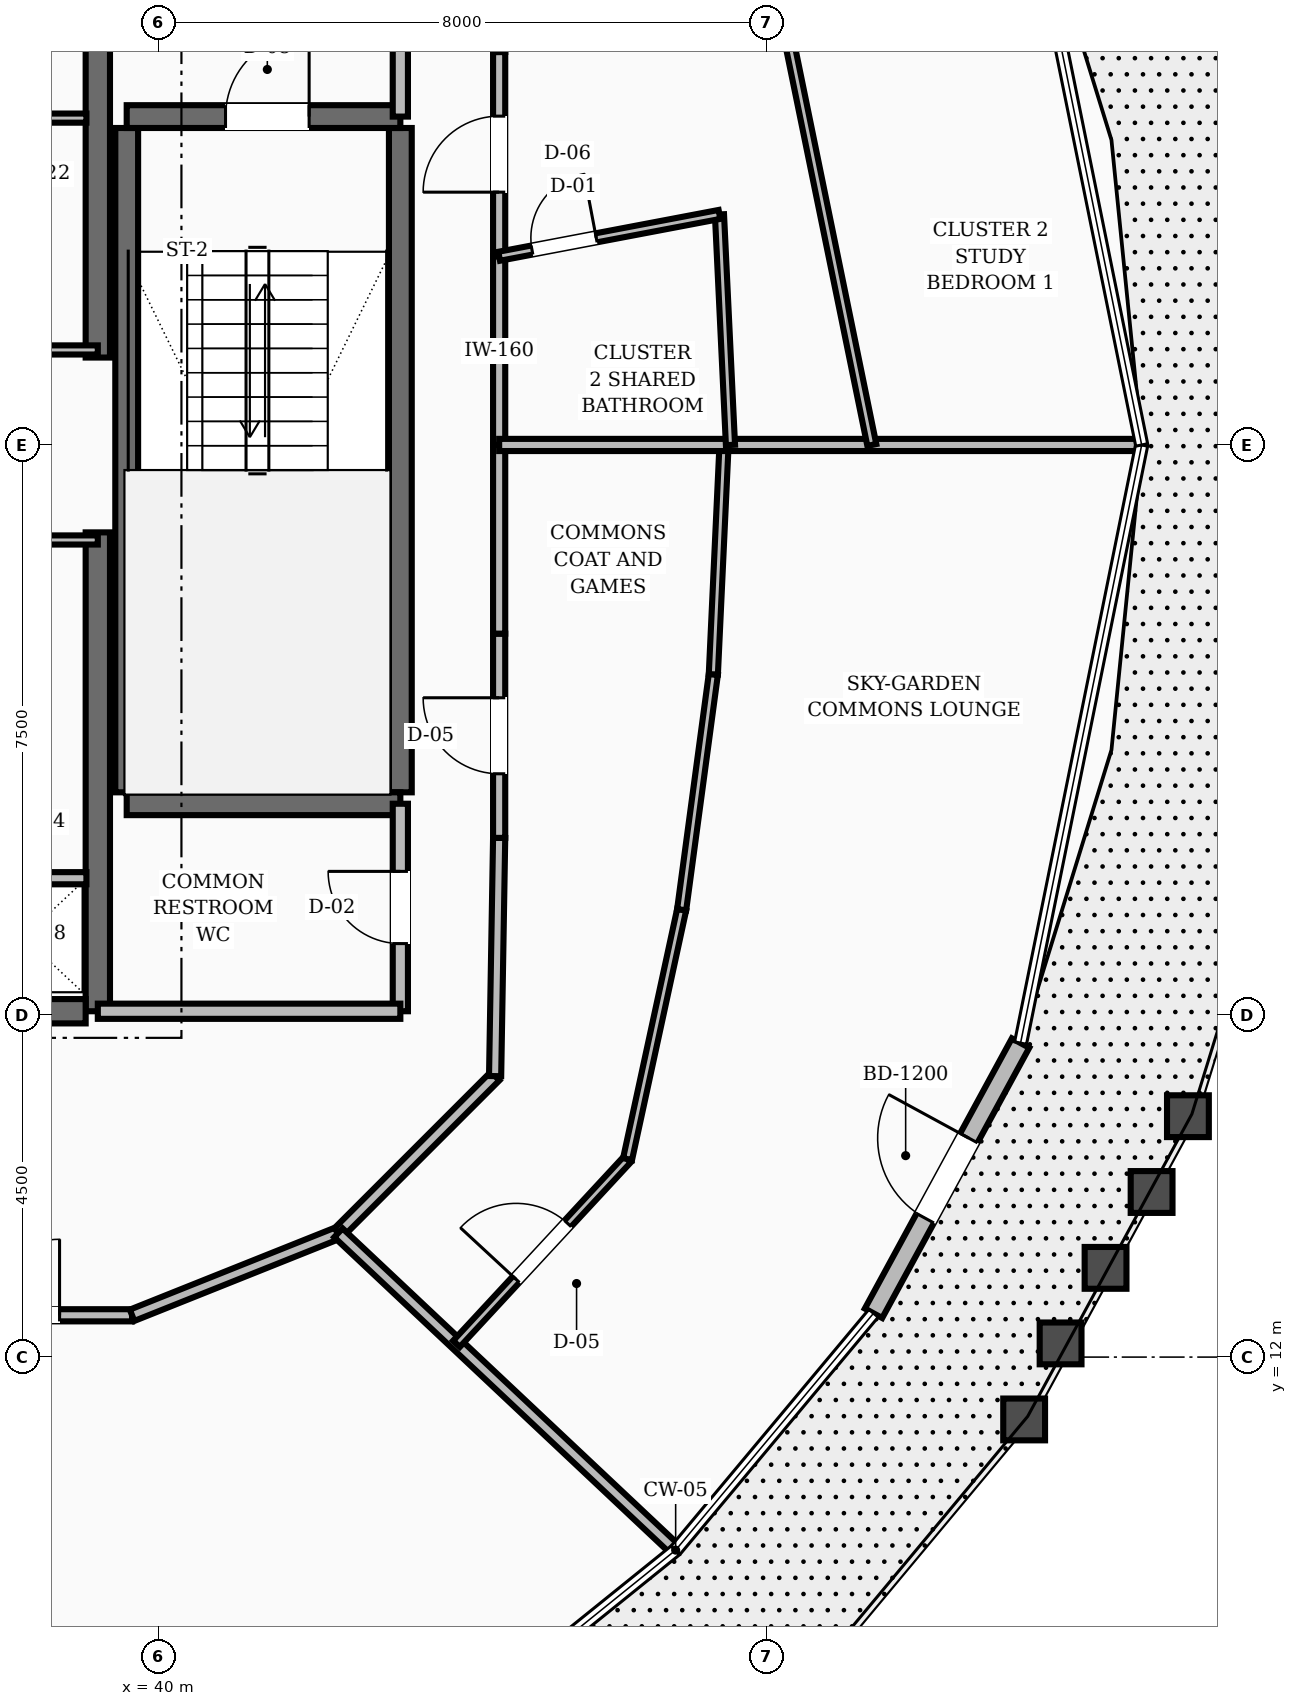
"""IFC4 building model, lengths in metres.
Left out: names, types, materials, properties, quantities, classifications, styles, units other than length and angle.
Written with IfcOpenShell. Run it as: python <this file> out.ifc"""

import sys

from ifc_helpers import new_model, si_unit, direction, frame, frame_2d, origin, place, context, subcontext, project, spatial, rectangle, extrude, element, fill, save


model = new_model("IFC4")
c1 = context("Model", 3, precision=1e-05, world=origin(), true_north=direction((0.0, 1.0)))
c2 = subcontext(c1, "Body", "Model", "MODEL_VIEW")
j1 = project(units=[si_unit("LENGTHUNIT", "METRE"), si_unit("PLANEANGLEUNIT", "RADIAN")], contexts=[c1])
p1 = place(None, origin())
s1 = spatial("IfcSite", under=j1, at=p1, CompositionType="ELEMENT")
p2 = place(p1, origin())
s2 = spatial("IfcBuilding", under=s1, at=p2, CompositionType="ELEMENT")
p3 = place(p2, frame((0.0, 0.0, 243.6)))
s3 = spatial("IfcBuildingStorey", under=s2, at=p3, CompositionType="ELEMENT", Elevation=243.6)
for number, where, z_axis, x_axis in (
    (1, (39.2, 16.55, 0.0), (0.0, 0.0, 1.0), (0.0, 1.0, 0.0)),
    (2, (39.2, 25.15, 0.0), (0.0, 0.0, 1.0), (0.0, 1.0, 0.0)),
):
    element("IfcWall", number, at=place(p3, frame(where, z_axis=z_axis, x_axis=x_axis)), inside=s3, PredefinedType="SHEAR", context=c2, shape_type="SweptSolid", body=[
        extrude(rectangle(XDim=6.3, YDim=0.32, at=frame_2d((3.15, 0.0))), origin(), (0.0, 0.0, 1.0), 3.6),
    ])
p4 = place(p3, frame((35.8, 16.55, 0.0), z_axis=(0.0, 0.0, 1.0), x_axis=(1.0, 0.0, 0.0)))
e3 = element("IfcWall", 3, at=p4, inside=s3, PredefinedType="SHEAR", context=c2, shape_type="SweptSolid", body=[
    extrude(rectangle(XDim=3.24, YDim=0.32, at=frame_2d((1.62, 0.0))), origin(), (0.0, 0.0, 1.0), 3.6),
])
p5 = place(p4, frame((0.3, 0.0, 0.0)))
e4 = element("IfcOpeningElement", 4, at=p5, cuts=e3, PredefinedType="OPENING", context=c2, shape_type="SweptSolid", body=[
    extrude(rectangle(XDim=1.1, YDim=2.1, at=frame_2d((0.55, 1.05))), frame((0.0, 0.17, 0.0), z_axis=(0.0, -1.0, 0.0), x_axis=(1.0, 0.0, 0.0)), (0.0, 0.0, 1.0), 0.34),
])
for number, where, z_axis, x_axis in (
    (5, (43.18, 19.43, 0.0), (0.0, 0.0, 1.0), (0.0, 1.0, 0.0)),
    (6, (39.58, 19.43, 0.0), (0.0, 0.0, 1.0), (0.0, 1.0, 0.0)),
):
    element("IfcWall", number, at=place(p3, frame(where, z_axis=z_axis, x_axis=x_axis)), inside=s3, PredefinedType="SHEAR", context=c2, shape_type="SweptSolid", body=[
        extrude(rectangle(XDim=8.74, YDim=0.3, at=frame_2d((4.37, 0.0))), origin(), (0.0, 0.0, 1.0), 3.6),
    ])
p6 = place(p3, frame((39.58, 19.28, 0.0), z_axis=(0.0, 0.0, 1.0), x_axis=(1.0, 0.0, 0.0)))
e7 = element("IfcWall", 7, at=p6, inside=s3, PredefinedType="SHEAR", context=c2, shape_type="SweptSolid", body=[
    extrude(rectangle(XDim=3.6, YDim=0.3, at=frame_2d((1.8, 0.0))), origin(), (0.0, 0.0, 1.0), 3.6),
])
p7 = place(p3, frame((39.58, 28.32, 0.0), z_axis=(0.0, 0.0, 1.0), x_axis=(1.0, 0.0, 0.0)))
e8 = element("IfcWall", 8, at=p7, inside=s3, PredefinedType="SHEAR", context=c2, shape_type="SweptSolid", body=[
    extrude(rectangle(XDim=3.6, YDim=0.3, at=frame_2d((1.8, 0.0))), origin(), (0.0, 0.0, 1.0), 3.6),
])
p8 = place(p7, frame((1.3, 0.0, 0.0)))
e9 = element("IfcOpeningElement", 9, at=p8, cuts=e8, PredefinedType="OPENING", context=c2, shape_type="SweptSolid", body=[
    extrude(rectangle(XDim=1.1, YDim=2.1, at=frame_2d((0.55, 1.05))), frame((0.0, 0.16, 0.0), z_axis=(0.0, -1.0, 0.0), x_axis=(1.0, 0.0, 0.0)), (0.0, 0.0, 1.0), 0.32),
])
p9 = place(p3, frame((49.405, 12.576, 0.0), z_axis=(0.0, 0.0, 1.0), x_axis=(0.4779981632, 0.878360834724, 0.0)))
e10 = element("IfcWall", 10, at=p9, inside=s3, PredefinedType="STANDARD", context=c2, shape_type="SweptSolid", body=[
    extrude(rectangle(XDim=4.047, YDim=0.26, at=frame_2d((2.023, 0.0))), origin(), (0.0, 0.0, 1.0), 2.88),
])
p10 = place(p9, frame((1.424, 0.0, 0.0)))
e11 = element("IfcOpeningElement", 11, at=p10, cuts=e10, PredefinedType="OPENING", context=c2, shape_type="SweptSolid", body=[
    extrude(rectangle(XDim=1.2, YDim=2.15, at=frame_2d((0.6, 1.075))), frame((0.0, 0.14, 0.0), z_axis=(0.0, -1.0, 0.0), x_axis=(1.0, 0.0, 0.0)), (0.0, 0.0, 1.0), 0.28),
])
p11 = place(p3, frame((43.18, 28.32, 0.0), z_axis=(0.0, 0.0, 1.0), x_axis=(0.0, 1.0, 0.0)))
e12 = element("IfcWall", 12, at=p11, inside=s3, PredefinedType="SOLIDWALL", context=c2, shape_type="SweptSolid", body=[
    extrude(rectangle(XDim=3.13, YDim=0.2, at=frame_2d((1.565, 0.0))), origin(), (0.0, 0.0, 1.0), 2.87),
])
p12 = place(p11, frame((1.015, 0.0, 0.0)))
e13 = element("IfcOpeningElement", 13, at=p12, cuts=e12, PredefinedType="OPENING", context=c2, shape_type="SweptSolid", body=[
    extrude(rectangle(XDim=1.1, YDim=2.1, at=frame_2d((0.55, 1.05))), frame((0.0, 0.11, 0.0), z_axis=(0.0, -1.0, 0.0), x_axis=(1.0, 0.0, 0.0)), (0.0, 0.0, 1.0), 0.22),
])
p13 = place(p3, frame((43.18, 16.55, 0.0), z_axis=(0.0, 0.0, 1.0), x_axis=(0.0, 1.0, 0.0)))
e14 = element("IfcWall", 14, at=p13, inside=s3, PredefinedType="SOLIDWALL", context=c2, shape_type="SweptSolid", body=[
    extrude(rectangle(XDim=2.73, YDim=0.2, at=frame_2d((1.365, 0.0))), origin(), (0.0, 0.0, 1.0), 2.87),
])
p14 = place(p13, frame((0.89, 0.0, 0.0)))
e15 = element("IfcOpeningElement", 15, at=p14, cuts=e14, PredefinedType="OPENING", context=c2, shape_type="SweptSolid", body=[
    extrude(rectangle(XDim=0.95, YDim=2.1, at=frame_2d((0.475, 1.05))), frame((0.0, 0.11, 0.0), z_axis=(0.0, -1.0, 0.0), x_axis=(1.0, 0.0, 0.0)), (0.0, 0.0, 1.0), 0.22),
])
p15 = place(p3, frame((39.2, 16.55, 0.0), z_axis=(0.0, 0.0, 1.0), x_axis=(1.0, 0.0, 0.0)))
e16 = element("IfcWall", 16, at=p15, inside=s3, PredefinedType="SOLIDWALL", context=c2, shape_type="SweptSolid", body=[
    extrude(rectangle(XDim=3.98, YDim=0.2, at=frame_2d((1.99, 0.0))), origin(), (0.0, 0.0, 1.0), 2.87),
])
p16 = place(p3, frame((37.4, 18.3, 0.0), z_axis=(0.0, 0.0, 1.0), x_axis=(1.0, 0.0, 0.0)))
e17 = element("IfcWall", 17, at=p16, inside=s3, PredefinedType="SOLIDWALL", context=c2, shape_type="SweptSolid", body=[
    extrude(rectangle(XDim=1.65, YDim=0.16, at=frame_2d((0.825, 0.0))), origin(), (0.0, 0.0, 1.0), 2.87),
])
for number, where, z_axis, x_axis in (
    (18, (37.4, 25.25, 0.0), (0.0, 0.0, 1.0), (1.0, 0.0, 0.0)),
    (19, (37.4, 22.75, 0.0), (0.0, 0.0, 1.0), (1.0, 0.0, 0.0)),
):
    element("IfcWall", number, at=place(p3, frame(where, z_axis=z_axis, x_axis=x_axis)), inside=s3, PredefinedType="PARTITIONING", context=c2, shape_type="SweptSolid", body=[
        extrude(rectangle(XDim=1.8, YDim=0.12, at=frame_2d((0.9, 0.0))), origin(), (0.0, 0.0, 1.0), 2.87),
    ])
p17 = place(p3, frame((37.4, 28.3, 0.0), z_axis=(0.0, 0.0, 1.0), x_axis=(1.0, 0.0, 0.0)))
e20 = element("IfcWall", 20, at=p17, inside=s3, PredefinedType="PARTITIONING", context=c2, shape_type="SweptSolid", body=[
    extrude(rectangle(XDim=1.65, YDim=0.12, at=frame_2d((0.825, 0.0))), origin(), (0.0, 0.0, 1.0), 2.87),
])
p18 = place(p3, frame((44.48, 24.0, 0.0), z_axis=(0.0, 0.0, 1.0), x_axis=(0.0, 1.0, 0.0)))
e21 = element("IfcWall", 21, at=p18, inside=s3, PredefinedType="SOLIDWALL", context=c2, shape_type="SweptSolid", body=[
    extrude(rectangle(XDim=2.482, YDim=0.16, at=frame_2d((1.241, 0.0))), origin(), (0.0, 0.0, 1.0), 2.87),
])
p19 = place(p3, frame((44.48, 26.482, 0.0), z_axis=(0.0, 0.0, 1.0), x_axis=(0.0, 1.0, 0.0)))
e22 = element("IfcWall", 22, at=p19, inside=s3, PredefinedType="SOLIDWALL", context=c2, shape_type="SweptSolid", body=[
    extrude(rectangle(XDim=2.687, YDim=0.16, at=frame_2d((1.344, 0.0))), origin(), (0.0, 0.0, 1.0), 2.87),
])
p20 = place(p19, frame((0.844, 0.0, 0.0)))
e23 = element("IfcOpeningElement", 23, at=p20, cuts=e22, PredefinedType="OPENING", context=c2, shape_type="SweptSolid", body=[
    extrude(rectangle(XDim=1.0, YDim=2.1, at=frame_2d((0.5, 1.05))), frame((0.0, 0.09, 0.0), z_axis=(0.0, -1.0, 0.0), x_axis=(1.0, 0.0, 0.0)), (0.0, 0.0, 1.0), 0.18),
])
p21 = place(p3, frame((44.48, 29.169, 0.0), z_axis=(0.0, 0.0, 1.0), x_axis=(-0.016981035134, 0.999855811828, 0.0)))
e24 = element("IfcWall", 24, at=p21, inside=s3, PredefinedType="SOLIDWALL", context=c2, shape_type="SweptSolid", body=[
    extrude(rectangle(XDim=3.134, YDim=0.16, at=frame_2d((1.567, 0.0))), origin(), (0.0, 0.0, 1.0), 2.87),
])
p22 = place(p3, frame((36.743, 12.55, 0.0), z_axis=(0.0, 0.0, 1.0), x_axis=(1.0, 0.0, 0.0)))
e25 = element("IfcWall", 25, at=p22, inside=s3, PredefinedType="SOLIDWALL", context=c2, shape_type="SweptSolid", body=[
    extrude(rectangle(XDim=2.908, YDim=0.16, at=frame_2d((1.454, 0.0))), origin(), (0.0, 0.0, 1.0), 2.87),
])
p23 = place(p22, frame((0.954, 0.0, 0.0)))
e26 = element("IfcOpeningElement", 26, at=p23, cuts=e25, PredefinedType="OPENING", context=c2, shape_type="SweptSolid", body=[
    extrude(rectangle(XDim=1.0, YDim=2.1, at=frame_2d((0.5, 1.05))), frame((0.0, 0.09, 0.0), z_axis=(0.0, -1.0, 0.0), x_axis=(1.0, 0.0, 0.0)), (0.0, 0.0, 1.0), 0.18),
])
p24 = place(p3, frame((39.651, 12.55, 0.0), z_axis=(0.0, 0.0, 1.0), x_axis=(0.92856882165, 0.371160266542, 0.0)))
e27 = element("IfcWall", 27, at=p24, inside=s3, PredefinedType="SOLIDWALL", context=c2, shape_type="SweptSolid", body=[
    extrude(rectangle(XDim=2.923, YDim=0.16, at=frame_2d((1.461, 0.0))), origin(), (0.0, 0.0, 1.0), 2.87),
])
p25 = place(p3, frame((42.365, 13.635, 0.0), z_axis=(0.0, 0.0, 1.0), x_axis=(0.707106781187, 0.707106781187, 0.0)))
e28 = element("IfcWall", 28, at=p25, inside=s3, PredefinedType="SOLIDWALL", context=c2, shape_type="SweptSolid", body=[
    extrude(rectangle(XDim=2.916, YDim=0.16, at=frame_2d((1.458, 0.0))), origin(), (0.0, 0.0, 1.0), 2.87),
])
p26 = place(p3, frame((44.427, 15.697, 0.0), z_axis=(0.0, 0.0, 1.0), x_axis=(0.016981035134, 0.999855811828, 0.0)))
e29 = element("IfcWall", 29, at=p26, inside=s3, PredefinedType="SOLIDWALL", context=c2, shape_type="SweptSolid", body=[
    extrude(rectangle(XDim=3.134, YDim=0.16, at=frame_2d((1.567, 0.0))), origin(), (0.0, 0.0, 1.0), 2.87),
])
p27 = place(p3, frame((44.48, 18.831, 0.0), z_axis=(0.0, 0.0, 1.0), x_axis=(0.0, 1.0, 0.0)))
e30 = element("IfcWall", 30, at=p27, inside=s3, PredefinedType="SOLIDWALL", context=c2, shape_type="SweptSolid", body=[
    extrude(rectangle(XDim=2.687, YDim=0.16, at=frame_2d((1.344, 0.0))), origin(), (0.0, 0.0, 1.0), 2.87),
])
p28 = place(p27, frame((0.844, 0.0, 0.0)))
e31 = element("IfcOpeningElement", 31, at=p28, cuts=e30, PredefinedType="OPENING", context=c2, shape_type="SweptSolid", body=[
    extrude(rectangle(XDim=1.0, YDim=2.1, at=frame_2d((0.5, 1.05))), frame((0.0, 0.09, 0.0), z_axis=(0.0, -1.0, 0.0), x_axis=(1.0, 0.0, 0.0)), (0.0, 0.0, 1.0), 0.18),
])
p29 = place(p3, frame((44.48, 21.518, 0.0), z_axis=(0.0, 0.0, 1.0), x_axis=(0.0, 1.0, 0.0)))
e32 = element("IfcWall", 32, at=p29, inside=s3, PredefinedType="SOLIDWALL", context=c2, shape_type="SweptSolid", body=[
    extrude(rectangle(XDim=2.482, YDim=0.16, at=frame_2d((1.241, 0.0))), origin(), (0.0, 0.0, 1.0), 2.87),
])
p30 = place(p3, frame((42.365, 13.635, 0.0), z_axis=(0.0, 0.0, 1.0), x_axis=(0.728335212041, -0.685221000044, 0.0)))
e33 = element("IfcWall", 33, at=p30, inside=s3, PredefinedType="SOLIDWALL", context=c2, shape_type="SweptSolid", body=[
    extrude(rectangle(XDim=6.042, YDim=0.16, at=frame_2d((3.021, 0.0))), origin(), (0.0, 0.0, 1.0), 2.87),
])
p31 = place(p3, frame((43.918, 12.174, 0.0), z_axis=(0.0, 0.0, 1.0), x_axis=(0.679543218501, 0.733635477733, 0.0)))
e34 = element("IfcWall", 34, at=p31, inside=s3, PredefinedType="PARTITIONING", context=c2, shape_type="SweptSolid", body=[
    extrude(rectangle(XDim=3.313, YDim=0.12, at=frame_2d((1.656, 0.0))), origin(), (0.0, 0.0, 1.0), 2.87),
])
p32 = place(p31, frame((1.156, 0.0, 0.0)))
e35 = element("IfcOpeningElement", 35, at=p32, cuts=e34, PredefinedType="OPENING", context=c2, shape_type="SweptSolid", body=[
    extrude(rectangle(XDim=1.0, YDim=2.1, at=frame_2d((0.5, 1.05))), frame((0.0, 0.07, 0.0), z_axis=(0.0, -1.0, 0.0), x_axis=(1.0, 0.0, 0.0)), (0.0, 0.0, 1.0), 0.14),
])
p33 = place(p3, frame((46.169, 14.604, 0.0), z_axis=(0.0, 0.0, 1.0), x_axis=(0.211961703206, 0.97727797293, 0.0)))
e36 = element("IfcWall", 36, at=p33, inside=s3, PredefinedType="PARTITIONING", context=c2, shape_type="SweptSolid", body=[
    extrude(rectangle(XDim=3.357, YDim=0.12, at=frame_2d((1.679, 0.0))), origin(), (0.0, 0.0, 1.0), 2.87),
])
p34 = place(p3, frame((46.881, 17.886, 0.0), z_axis=(0.0, 0.0, 1.0), x_axis=(0.133453335491, 0.991055097987, 0.0)))
e37 = element("IfcWall", 37, at=p34, inside=s3, PredefinedType="PARTITIONING", context=c2, shape_type="SweptSolid", body=[
    extrude(rectangle(XDim=3.125, YDim=0.12, at=frame_2d((1.562, 0.0))), origin(), (0.0, 0.0, 1.0), 2.87),
])
p35 = place(p3, frame((47.298, 20.982, 0.0), z_axis=(0.0, 0.0, 1.0), x_axis=(0.046632063195, 0.998912133614, 0.0)))
e38 = element("IfcWall", 38, at=p35, inside=s3, PredefinedType="PARTITIONING", context=c2, shape_type="SweptSolid", body=[
    extrude(rectangle(XDim=3.021, YDim=0.12, at=frame_2d((1.51, 0.0))), origin(), (0.0, 0.0, 1.0), 2.87),
])
p36 = place(p3, frame((44.48, 24.0, 0.0), z_axis=(0.0, 0.0, 1.0), x_axis=(1.0, 0.0, 0.0)))
e39 = element("IfcWall", 39, at=p36, inside=s3, PredefinedType="SOLIDWALL", context=c2, shape_type="SweptSolid", body=[
    extrude(rectangle(XDim=8.403, YDim=0.16, at=frame_2d((4.202, 0.0))), origin(), (0.0, 0.0, 1.0), 2.87),
])
p37 = place(p3, frame((47.523, 24.0, 0.0), z_axis=(0.0, 0.0, 1.0), x_axis=(-0.047683582127, 0.998862491034, 0.0)))
e40 = element("IfcWall", 40, at=p37, inside=s3, PredefinedType="PARTITIONING", context=c2, shape_type="SweptSolid", body=[
    extrude(rectangle(XDim=3.036, YDim=0.12, at=frame_2d((1.518, 0.0))), origin(), (0.0, 0.0, 1.0), 2.87),
])
p38 = place(p3, frame((44.48, 26.482, 0.0), z_axis=(0.0, 0.0, 1.0), x_axis=(0.982449937111, 0.186526462117, 0.0)))
e41 = element("IfcWall", 41, at=p38, inside=s3, PredefinedType="PARTITIONING", context=c2, shape_type="SweptSolid", body=[
    extrude(rectangle(XDim=2.95, YDim=0.12, at=frame_2d((1.475, 0.0))), origin(), (0.0, 0.0, 1.0), 2.87),
])
p39 = place(p38, frame((0.44, 0.0, 0.0)))
e42 = element("IfcOpeningElement", 42, at=p39, cuts=e41, PredefinedType="OPENING", context=c2, shape_type="SweptSolid", body=[
    extrude(rectangle(XDim=0.86, YDim=2.1, at=frame_2d((0.43, 1.05))), frame((0.0, 0.07, 0.0), z_axis=(0.0, -1.0, 0.0), x_axis=(1.0, 0.0, 0.0)), (0.0, 0.0, 1.0), 0.14),
])
p40 = place(p3, frame((49.383, 24.0, 0.0), z_axis=(0.0, 0.0, 1.0), x_axis=(-0.200398815881, 0.979714404607, 0.0)))
e43 = element("IfcWall", 43, at=p40, inside=s3, PredefinedType="PARTITIONING", context=c2, shape_type="SweptSolid", body=[
    extrude(rectangle(XDim=10.323, YDim=0.12, at=frame_2d((5.161, 0.0))), origin(), (0.0, 0.0, 1.0), 2.87),
])
p41 = place(p40, frame((6.554, 0.0, 0.0)))
e44 = element("IfcOpeningElement", 44, at=p41, cuts=e43, PredefinedType="OPENING", context=c2, shape_type="SweptSolid", body=[
    extrude(rectangle(XDim=0.95, YDim=2.1, at=frame_2d((0.475, 1.05))), frame((0.0, 0.07, 0.0), z_axis=(0.0, -1.0, 0.0), x_axis=(1.0, 0.0, 0.0)), (0.0, 0.0, 1.0), 0.14),
])
p42 = place(p10, origin())
e45 = element("IfcDoor", 45, at=p42, inside=s3, OperationType="SINGLE_SWING_RIGHT", PredefinedType="DOOR", context=c2, shape_type="SweptSolid", body=[
    extrude(rectangle(XDim=1.2, YDim=2.15, at=frame_2d((0.6, 1.075))), frame((0.0, 0.025, 0.0), z_axis=(0.0, -1.0, 0.0), x_axis=(1.0, 0.0, 0.0)), (0.0, 0.0, 1.0), 0.05),
])
fill(e11, e45)
p43 = place(p8, origin())
e46 = element("IfcDoor", 46, at=p43, inside=s3, OperationType="SINGLE_SWING_RIGHT", PredefinedType="DOOR", context=c2, shape_type="SweptSolid", body=[
    extrude(rectangle(XDim=1.1, YDim=2.1, at=frame_2d((0.55, 1.05))), frame((0.0, 0.025, 0.0), z_axis=(0.0, -1.0, 0.0), x_axis=(1.0, 0.0, 0.0)), (0.0, 0.0, 1.0), 0.05),
])
fill(e9, e46)
p44 = place(p14, origin())
e47 = element("IfcDoor", 47, at=p44, inside=s3, OperationType="SINGLE_SWING_RIGHT", PredefinedType="DOOR", context=c2, shape_type="SweptSolid", body=[
    extrude(rectangle(XDim=0.95, YDim=2.1, at=frame_2d((0.475, 1.05))), frame((0.0, 0.025, 0.0), z_axis=(0.0, -1.0, 0.0), x_axis=(1.0, 0.0, 0.0)), (0.0, 0.0, 1.0), 0.05),
])
fill(e15, e47)
p45 = place(p28, origin())
e48 = element("IfcDoor", 48, at=p45, inside=s3, OperationType="SINGLE_SWING_RIGHT", PredefinedType="DOOR", context=c2, shape_type="SweptSolid", body=[
    extrude(rectangle(XDim=1.0, YDim=2.1, at=frame_2d((0.5, 1.05))), frame((0.0, 0.025, 0.0), z_axis=(0.0, -1.0, 0.0), x_axis=(1.0, 0.0, 0.0)), (0.0, 0.0, 1.0), 0.05),
])
fill(e31, e48)
p46 = place(p32, origin())
e49 = element("IfcDoor", 49, at=p46, inside=s3, OperationType="SINGLE_SWING_LEFT", PredefinedType="DOOR", context=c2, shape_type="SweptSolid", body=[
    extrude(rectangle(XDim=1.0, YDim=2.1, at=frame_2d((0.5, 1.05))), frame((0.0, 0.025, 0.0), z_axis=(0.0, -1.0, 0.0), x_axis=(1.0, 0.0, 0.0)), (0.0, 0.0, 1.0), 0.05),
])
fill(e35, e49)
p47 = place(p39, origin())
e50 = element("IfcDoor", 50, at=p47, inside=s3, OperationType="SINGLE_SWING_RIGHT", PredefinedType="DOOR", context=c2, shape_type="SweptSolid", body=[
    extrude(rectangle(XDim=0.86, YDim=2.1, at=frame_2d((0.43, 1.05))), frame((0.0, 0.025, 0.0), z_axis=(0.0, -1.0, 0.0), x_axis=(1.0, 0.0, 0.0)), (0.0, 0.0, 1.0), 0.05),
])
fill(e42, e50)
p48 = place(p20, origin())
e51 = element("IfcDoor", 51, at=p48, inside=s3, OperationType="SINGLE_SWING_LEFT", PredefinedType="DOOR", context=c2, shape_type="SweptSolid", body=[
    extrude(rectangle(XDim=1.0, YDim=2.1, at=frame_2d((0.5, 1.05))), frame((0.0, 0.025, 0.0), z_axis=(0.0, -1.0, 0.0), x_axis=(1.0, 0.0, 0.0)), (0.0, 0.0, 1.0), 0.05),
])
fill(e23, e51)
p49 = place(p23, origin())
e52 = element("IfcDoor", 52, at=p49, inside=s3, OperationType="SINGLE_SWING_RIGHT", PredefinedType="DOOR", context=c2, shape_type="SweptSolid", body=[
    extrude(rectangle(XDim=1.0, YDim=2.1, at=frame_2d((0.5, 1.05))), frame((0.0, 0.025, 0.0), z_axis=(0.0, -1.0, 0.0), x_axis=(1.0, 0.0, 0.0)), (0.0, 0.0, 1.0), 0.05),
])
fill(e26, e52)
save(model, sys.argv[1])
